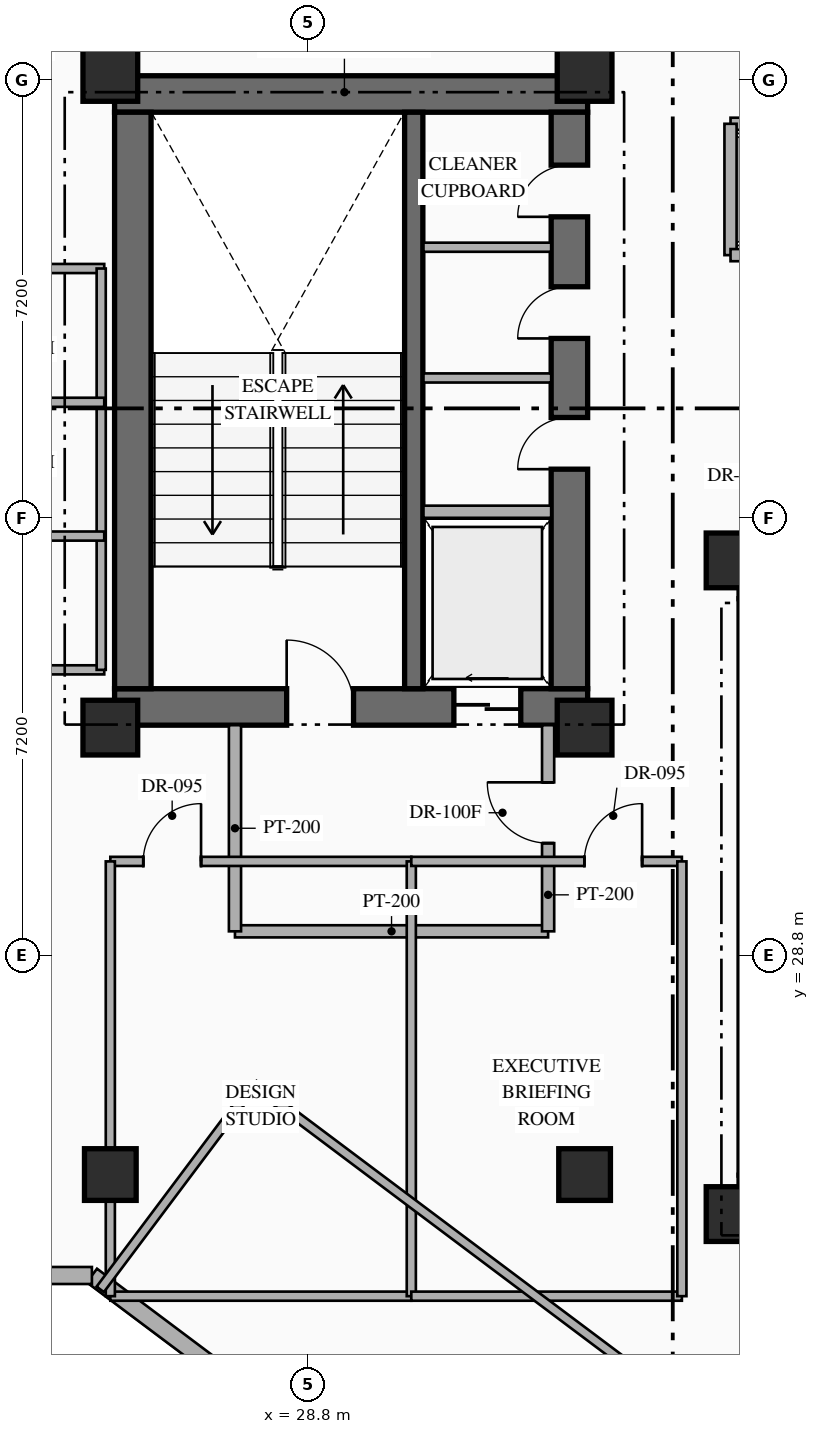
"""IFC4 building model, lengths in metres.
Left out: names, types, materials, properties, quantities, classifications, styles, units other than length and angle.
Written with IfcOpenShell. Run it as: python <this file> out.ifc"""

import sys

from ifc_helpers import new_model, si_unit, direction, frame, frame_2d, origin, origin_2d, place, context, subcontext, project, spatial, rectangle, hollow_rectangle, extrude, element, fill, save


model = new_model("IFC4")
c1 = context("Model", 3, precision=1e-05, world=origin(), true_north=direction((0.0, 1.0)))
c2 = subcontext(c1, "Body", "Model", "MODEL_VIEW")
j1 = project(units=[si_unit("LENGTHUNIT", "METRE"), si_unit("PLANEANGLEUNIT", "RADIAN")], contexts=[c1])
p1 = place(None, origin())
s1 = spatial("IfcSite", under=j1, at=p1, CompositionType="ELEMENT")
p2 = place(p1, origin())
s2 = spatial("IfcBuilding", under=s1, at=p2, CompositionType="ELEMENT")
p3 = place(p2, frame((0.0, 0.0, 138.45)))
s3 = spatial("IfcBuildingStorey", under=s2, at=p3, CompositionType="ELEMENT", Elevation=138.45)
p4 = place(p3, frame((25.62, 32.89, 0.0), z_axis=(0.0, 0.0, 1.0), x_axis=(1.0, 0.0, 0.0)))
e1 = element("IfcWall", 1, at=p4, inside=s3, PredefinedType="SHEAR", context=c2, shape_type="SweptSolid", body=[
    extrude(rectangle(XDim=7.78, YDim=0.6, at=frame_2d((3.89, 0.0))), origin(), (0.0, 0.0, 1.0), 3.6),
])
p5 = place(p4, frame((2.83, 0.0, 0.0)))
e2 = element("IfcOpeningElement", 2, at=p5, cuts=e1, PredefinedType="OPENING", context=c2, shape_type="SweptSolid", body=[
    extrude(rectangle(XDim=1.1, YDim=2.2, at=frame_2d((0.55, 1.1))), frame((0.0, 0.31, 0.0), z_axis=(0.0, -1.0, 0.0), x_axis=(1.0, 0.0, 0.0)), (0.0, 0.0, 1.0), 0.62),
])
p6 = place(p4, frame((5.58, 0.0, 0.0)))
e3 = element("IfcOpeningElement", 3, at=p6, cuts=e1, PredefinedType="OPENING", context=c2, shape_type="SweptSolid", body=[
    extrude(rectangle(XDim=1.1, YDim=2.15, at=frame_2d((0.55, 1.075))), frame((0.0, 0.31, 0.0), z_axis=(0.0, -1.0, 0.0), x_axis=(1.0, 0.0, 0.0)), (0.0, 0.0, 1.0), 0.62),
])
p7 = place(p3, frame((25.62, 42.97, 0.0), z_axis=(0.0, 0.0, 1.0), x_axis=(1.0, 0.0, 0.0)))
e4 = element("IfcWall", 4, at=p7, inside=s3, PredefinedType="SHEAR", context=c2, shape_type="SweptSolid", body=[
    extrude(rectangle(XDim=7.78, YDim=0.6, at=frame_2d((3.89, 0.0))), origin(), (0.0, 0.0, 1.0), 3.6),
])
p8 = place(p3, frame((25.92, 33.19, 0.0), z_axis=(0.0, 0.0, 1.0), x_axis=(0.0, 1.0, 0.0)))
e5 = element("IfcWall", 5, at=p8, inside=s3, PredefinedType="SHEAR", context=c2, shape_type="SweptSolid", body=[
    extrude(rectangle(XDim=9.48, YDim=0.6, at=frame_2d((4.74, 0.0))), origin(), (0.0, 0.0, 1.0), 3.6),
])
p9 = place(p3, frame((33.1, 33.19, 0.0), z_axis=(0.0, 0.0, 1.0), x_axis=(0.0, 1.0, 0.0)))
e6 = element("IfcWall", 6, at=p9, inside=s3, PredefinedType="SHEAR", context=c2, shape_type="SweptSolid", body=[
    extrude(rectangle(XDim=9.48, YDim=0.6, at=frame_2d((4.74, 0.0))), origin(), (0.0, 0.0, 1.0), 3.6),
])
p10 = place(p9, frame((3.61, 0.0, 0.0)))
e7 = element("IfcOpeningElement", 7, at=p10, cuts=e6, PredefinedType="OPENING", context=c2, shape_type="SweptSolid", body=[
    extrude(rectangle(XDim=0.85, YDim=2.08, at=frame_2d((0.425, 1.04))), frame((0.0, 0.31, 0.0), z_axis=(0.0, -1.0, 0.0), x_axis=(1.0, 0.0, 0.0)), (0.0, 0.0, 1.0), 0.62),
])
p11 = place(p9, frame((5.76, 0.0, 0.0)))
e8 = element("IfcOpeningElement", 8, at=p11, cuts=e6, PredefinedType="OPENING", context=c2, shape_type="SweptSolid", body=[
    extrude(rectangle(XDim=0.85, YDim=2.08, at=frame_2d((0.425, 1.04))), frame((0.0, 0.31, 0.0), z_axis=(0.0, -1.0, 0.0), x_axis=(1.0, 0.0, 0.0)), (0.0, 0.0, 1.0), 0.62),
])
p12 = place(p9, frame((7.76, 0.0, 0.0)))
e9 = element("IfcOpeningElement", 9, at=p12, cuts=e6, PredefinedType="OPENING", context=c2, shape_type="SweptSolid", body=[
    extrude(rectangle(XDim=0.85, YDim=2.08, at=frame_2d((0.425, 1.04))), frame((0.0, 0.31, 0.0), z_axis=(0.0, -1.0, 0.0), x_axis=(1.0, 0.0, 0.0)), (0.0, 0.0, 1.0), 0.62),
])
p13 = place(p3, frame((30.54, 33.19, 0.0), z_axis=(0.0, 0.0, 1.0), x_axis=(0.0, 1.0, 0.0)))
e10 = element("IfcWall", 10, at=p13, inside=s3, PredefinedType="SHEAR", context=c2, shape_type="SweptSolid", body=[
    extrude(rectangle(XDim=9.48, YDim=0.3, at=frame_2d((4.74, 0.0))), origin(), (0.0, 0.0, 1.0), 3.6),
])
p14 = place(p3, frame((35.89, 24.89, 0.0), z_axis=(0.0, 0.0, 1.0), x_axis=(1.0, 0.0, 0.0)))
e11 = element("IfcWall", 11, at=p14, inside=s3, PredefinedType="SHEAR", context=c2, shape_type="SweptSolid", body=[
    extrude(rectangle(XDim=7.76, YDim=0.6, at=frame_2d((3.88, 0.0))), origin(), (0.0, 0.0, 1.0), 3.6),
])
p15 = place(p3, frame((35.89, 34.97, 0.0), z_axis=(0.0, 0.0, 1.0), x_axis=(1.0, 0.0, 0.0)))
e12 = element("IfcWall", 12, at=p15, inside=s3, PredefinedType="SHEAR", context=c2, shape_type="SweptSolid", body=[
    extrude(rectangle(XDim=7.76, YDim=0.6, at=frame_2d((3.88, 0.0))), origin(), (0.0, 0.0, 1.0), 3.6),
])
p16 = place(p15, frame((2.66, 0.0, 0.0)))
e13 = element("IfcOpeningElement", 13, at=p16, cuts=e12, PredefinedType="OPENING", context=c2, shape_type="SweptSolid", body=[
    extrude(rectangle(XDim=1.1, YDim=2.2, at=frame_2d((0.55, 1.1))), frame((0.0, 0.31, 0.0), z_axis=(0.0, -1.0, 0.0), x_axis=(1.0, 0.0, 0.0)), (0.0, 0.0, 1.0), 0.62),
])
p17 = place(p15, frame((5.56, 0.0, 0.0)))
e14 = element("IfcOpeningElement", 14, at=p17, cuts=e12, PredefinedType="OPENING", context=c2, shape_type="SweptSolid", body=[
    extrude(rectangle(XDim=1.12, YDim=2.15, at=frame_2d((0.56, 1.075))), frame((0.0, 0.31, 0.0), z_axis=(0.0, -1.0, 0.0), x_axis=(1.0, 0.0, 0.0)), (0.0, 0.0, 1.0), 0.62),
])
p18 = place(p3, frame((36.19, 25.19, 0.0), z_axis=(0.0, 0.0, 1.0), x_axis=(0.0, 1.0, 0.0)))
e15 = element("IfcWall", 15, at=p18, inside=s3, PredefinedType="SHEAR", context=c2, shape_type="SweptSolid", body=[
    extrude(rectangle(XDim=9.48, YDim=0.6, at=frame_2d((4.74, 0.0))), origin(), (0.0, 0.0, 1.0), 3.6),
])
for number, where, z_axis, x_axis in (
    (16, (25.55, 32.55, 0.0), (0.0, 0.0, 1.0), (1.0, 0.0, 0.0)),
    (17, (33.35, 32.55, 0.0), (0.0, 0.0, 1.0), (1.0, 0.0, 0.0)),
    (18, (25.55, 43.3, 0.0), (0.0, 0.0, 1.0), (1.0, 0.0, 0.0)),
    (19, (33.35, 43.3, 0.0), (0.0, 0.0, 1.0), (1.0, 0.0, 0.0)),
    (20, (35.8, 24.55, 0.0), (0.0, 0.0, 1.0), (1.0, 0.0, 0.0)),
    (21, (35.8, 35.3, 0.0), (0.0, 0.0, 1.0), (1.0, 0.0, 0.0)),
):
    element("IfcColumn", number, at=place(p3, frame(where, z_axis=z_axis, x_axis=x_axis)), inside=s3, PredefinedType="COLUMN", context=c2, shape_type="SweptSolid", body=[
        extrude(rectangle(XDim=0.9, YDim=0.9, at=origin_2d()), origin(), (0.0, 0.0, 1.0), 3.6),
    ])
for number, where, z_axis, x_axis in (
    (22, (25.55, 25.2, 0.0), (0.0, 0.0, 1.0), (1.0, 0.0, 0.0)),
    (23, (33.35, 25.2, 0.0), (0.0, 0.0, 1.0), (1.0, 0.0, 0.0)),
):
    element("IfcColumn", number, at=place(p3, frame(where, z_axis=z_axis, x_axis=x_axis)), inside=s3, PredefinedType="COLUMN", context=c2, shape_type="SweptSolid", body=[
        extrude(hollow_rectangle(XDim=0.85, YDim=0.85, WallThickness=0.032, at=origin_2d()), origin(), (0.0, 0.0, 1.0), 3.6),
    ])
p19 = place(p3, frame((44.918, 8.787, 0.0), z_axis=(0.0, 0.0, 1.0), x_axis=(-0.800004765927, 0.599993645378, 0.0)))
e24 = element("IfcWall", 24, at=p19, inside=s3, PredefinedType="STANDARD", context=c2, shape_type="SweptSolid", body=[
    extrude(rectangle(XDim=24.588, YDim=0.28, at=frame_2d((12.294, 0.0))), origin(), (0.0, 0.0, 1.0), 3.35),
])
p20 = place(p3, frame((25.247, 23.54, 0.0), z_axis=(0.0, 0.0, 1.0), x_axis=(-1.0, 0.0, 0.0)))
e25 = element("IfcWall", 25, at=p20, inside=s3, PredefinedType="STANDARD", context=c2, shape_type="SweptSolid", body=[
    extrude(rectangle(XDim=6.747, YDim=0.28, at=frame_2d((3.374, 0.0))), origin(), (0.0, 0.0, 1.0), 3.35),
])
p21 = place(p3, frame((30.7, 36.1, 0.0), z_axis=(0.0, 0.0, 1.0), x_axis=(1.0, 0.0, 0.0)))
e26 = element("IfcWall", 26, at=p21, inside=s3, PredefinedType="STANDARD", context=c2, shape_type="SweptSolid", body=[
    extrude(rectangle(XDim=2.1, YDim=0.2, at=frame_2d((1.05, 0.0))), origin(), (0.0, 0.0, 1.0), 3.35),
])
for number, where, z_axis, x_axis in (
    (27, (30.7, 38.3, 0.0), (0.0, 0.0, 1.0), (1.0, 0.0, 0.0)),
    (28, (30.7, 40.45, 0.0), (0.0, 0.0, 1.0), (1.0, 0.0, 0.0)),
):
    element("IfcWall", number, at=place(p3, frame(where, z_axis=z_axis, x_axis=x_axis)), inside=s3, PredefinedType="PARTITIONING", context=c2, shape_type="SweptSolid", body=[
        extrude(rectangle(XDim=2.1, YDim=0.15, at=frame_2d((1.05, 0.0))), origin(), (0.0, 0.0, 1.0), 3.35),
    ])
p22 = place(p3, frame((27.6, 29.2, 0.0), z_axis=(0.0, 0.0, 1.0), x_axis=(1.0, 0.0, 0.0)))
e29 = element("IfcWall", 29, at=p22, inside=s3, PredefinedType="STANDARD", context=c2, shape_type="SweptSolid", body=[
    extrude(rectangle(XDim=5.15, YDim=0.2, at=frame_2d((2.575, 0.0))), origin(), (0.0, 0.0, 1.0), 3.35),
])
p23 = place(p3, frame((27.6, 29.2, 0.0), z_axis=(0.0, 0.0, 1.0), x_axis=(0.0, 1.0, 0.0)))
e30 = element("IfcWall", 30, at=p23, inside=s3, PredefinedType="STANDARD", context=c2, shape_type="SweptSolid", body=[
    extrude(rectangle(XDim=3.39, YDim=0.2, at=frame_2d((1.695, 0.0))), origin(), (0.0, 0.0, 1.0), 3.35),
])
p24 = place(p3, frame((32.75, 29.2, 0.0), z_axis=(0.0, 0.0, 1.0), x_axis=(0.0, 1.0, 0.0)))
e31 = element("IfcWall", 31, at=p24, inside=s3, PredefinedType="STANDARD", context=c2, shape_type="SweptSolid", body=[
    extrude(rectangle(XDim=3.39, YDim=0.2, at=frame_2d((1.695, 0.0))), origin(), (0.0, 0.0, 1.0), 3.35),
])
p25 = place(p24, frame((1.45, 0.0, 0.0)))
e32 = element("IfcOpeningElement", 32, at=p25, cuts=e31, PredefinedType="OPENING", context=c2, shape_type="SweptSolid", body=[
    extrude(rectangle(XDim=1.0, YDim=2.2, at=frame_2d((0.5, 1.1))), frame((0.0, 0.11, 0.0), z_axis=(0.0, -1.0, 0.0), x_axis=(1.0, 0.0, 0.0)), (0.0, 0.0, 1.0), 0.22),
])
p26 = place(p3, frame((35.75, 42.48, 0.0), z_axis=(0.0, 0.0, 1.0), x_axis=(1.0, 0.0, 0.0)))
e33 = element("IfcWall", 33, at=p26, inside=s3, PredefinedType="STANDARD", context=c2, shape_type="SweptSolid", body=[
    extrude(rectangle(XDim=9.11, YDim=0.2, at=frame_2d((4.555, 0.0))), origin(), (0.0, 0.0, 1.0), 3.35),
])
p27 = place(p3, frame((35.75, 40.32, 0.0), z_axis=(0.0, 0.0, 1.0), x_axis=(0.0, 1.0, 0.0)))
e34 = element("IfcWall", 34, at=p27, inside=s3, PredefinedType="STANDARD", context=c2, shape_type="SweptSolid", body=[
    extrude(rectangle(XDim=2.16, YDim=0.2, at=frame_2d((1.08, 0.0))), origin(), (0.0, 0.0, 1.0), 3.35),
])
p28 = place(p3, frame((35.75, 40.32, 0.0), z_axis=(0.0, 0.0, 1.0), x_axis=(1.0, 0.0, 0.0)))
e35 = element("IfcWall", 35, at=p28, inside=s3, PredefinedType="STANDARD", context=c2, shape_type="SweptSolid", body=[
    extrude(rectangle(XDim=9.11, YDim=0.2, at=frame_2d((4.555, 0.0))), origin(), (0.0, 0.0, 1.0), 3.35),
])
p29 = place(p28, frame((0.53, 0.0, 0.0)))
e36 = element("IfcOpeningElement", 36, at=p29, cuts=e35, PredefinedType="OPENING", context=c2, shape_type="SweptSolid", body=[
    extrude(rectangle(XDim=1.1, YDim=2.18, at=frame_2d((0.55, 1.09))), frame((0.0, 0.11, 0.0), z_axis=(0.0, -1.0, 0.0), x_axis=(1.0, 0.0, 0.0)), (0.0, 0.0, 1.0), 0.22),
])
p30 = place(p28, frame((2.73, 0.0, 0.0)))
e37 = element("IfcOpeningElement", 37, at=p30, cuts=e35, PredefinedType="OPENING", context=c2, shape_type="SweptSolid", body=[
    extrude(rectangle(XDim=1.1, YDim=2.18, at=frame_2d((0.55, 1.09))), frame((0.0, 0.11, 0.0), z_axis=(0.0, -1.0, 0.0), x_axis=(1.0, 0.0, 0.0)), (0.0, 0.0, 1.0), 0.22),
])
p31 = place(p28, frame((4.93, 0.0, 0.0)))
e38 = element("IfcOpeningElement", 38, at=p31, cuts=e35, PredefinedType="OPENING", context=c2, shape_type="SweptSolid", body=[
    extrude(rectangle(XDim=1.1, YDim=2.18, at=frame_2d((0.55, 1.09))), frame((0.0, 0.11, 0.0), z_axis=(0.0, -1.0, 0.0), x_axis=(1.0, 0.0, 0.0)), (0.0, 0.0, 1.0), 0.22),
])
p32 = place(p28, frame((7.13, 0.0, 0.0)))
e39 = element("IfcOpeningElement", 39, at=p32, cuts=e35, PredefinedType="OPENING", context=c2, shape_type="SweptSolid", body=[
    extrude(rectangle(XDim=1.1, YDim=2.18, at=frame_2d((0.55, 1.09))), frame((0.0, 0.11, 0.0), z_axis=(0.0, -1.0, 0.0), x_axis=(1.0, 0.0, 0.0)), (0.0, 0.0, 1.0), 0.22),
])
for number, where, z_axis, x_axis in (
    (40, (22.15, 33.5, 0.0), (0.0, 0.0, 1.0), (1.0, 0.0, 0.0)),
    (41, (22.15, 40.1, 0.0), (0.0, 0.0, 1.0), (1.0, 0.0, 0.0)),
):
    element("IfcWall", number, at=place(p3, frame(where, z_axis=z_axis, x_axis=x_axis)), inside=s3, PredefinedType="PARTITIONING", context=c2, shape_type="SweptSolid", body=[
        extrude(rectangle(XDim=3.3, YDim=0.15, at=frame_2d((1.65, 0.0))), origin(), (0.0, 0.0, 1.0), 3.35),
    ])
p33 = place(p3, frame((25.4, 33.5, 0.0), z_axis=(0.0, 0.0, 1.0), x_axis=(0.0, 1.0, 0.0)))
e42 = element("IfcWall", 42, at=p33, inside=s3, PredefinedType="PARTITIONING", context=c2, shape_type="SweptSolid", body=[
    extrude(rectangle(XDim=6.6, YDim=0.15, at=frame_2d((3.3, 0.0))), origin(), (0.0, 0.0, 1.0), 3.35),
])
for number, where, z_axis, x_axis in (
    (43, (22.15, 35.7, 0.0), (0.0, 0.0, 1.0), (1.0, 0.0, 0.0)),
    (44, (22.15, 37.9, 0.0), (0.0, 0.0, 1.0), (1.0, 0.0, 0.0)),
):
    element("IfcWall", number, at=place(p3, frame(where, z_axis=z_axis, x_axis=x_axis)), inside=s3, PredefinedType="PARTITIONING", context=c2, shape_type="SweptSolid", body=[
        extrude(rectangle(XDim=3.3, YDim=0.15, at=frame_2d((1.65, 0.0))), origin(), (0.0, 0.0, 1.0), 3.35),
    ])
p34 = place(p3, frame((25.55, 23.2, 0.0), z_axis=(0.0, 0.0, 1.0), x_axis=(1.0, 0.0, 0.0)))
e45 = element("IfcWall", 45, at=p34, inside=s3, PredefinedType="PARTITIONING", context=c2, shape_type="SweptSolid", body=[
    extrude(rectangle(XDim=4.95, YDim=0.15, at=frame_2d((2.475, 0.0))), origin(), (0.0, 0.0, 1.0), 3.35),
])
p35 = place(p3, frame((25.55, 30.35, 0.0), z_axis=(0.0, 0.0, 1.0), x_axis=(1.0, 0.0, 0.0)))
e46 = element("IfcWall", 46, at=p35, inside=s3, PredefinedType="PARTITIONING", context=c2, shape_type="SweptSolid", body=[
    extrude(rectangle(XDim=4.95, YDim=0.15, at=frame_2d((2.475, 0.0))), origin(), (0.0, 0.0, 1.0), 3.35),
])
p36 = place(p35, frame((0.542, 0.0, 0.0)))
e47 = element("IfcOpeningElement", 47, at=p36, cuts=e46, PredefinedType="OPENING", context=c2, shape_type="SweptSolid", body=[
    extrude(rectangle(XDim=0.95, YDim=2.15, at=frame_2d((0.475, 1.075))), frame((0.0, 0.085, 0.0), z_axis=(0.0, -1.0, 0.0), x_axis=(1.0, 0.0, 0.0)), (0.0, 0.0, 1.0), 0.17),
])
p37 = place(p3, frame((25.55, 23.2, 0.0), z_axis=(0.0, 0.0, 1.0), x_axis=(0.0, 1.0, 0.0)))
e48 = element("IfcWall", 48, at=p37, inside=s3, PredefinedType="PARTITIONING", context=c2, shape_type="SweptSolid", body=[
    extrude(rectangle(XDim=7.15, YDim=0.15, at=frame_2d((3.575, 0.0))), origin(), (0.0, 0.0, 1.0), 2.695),
])
p38 = place(p3, frame((30.5, 23.2, 0.0), z_axis=(0.0, 0.0, 1.0), x_axis=(0.0, 1.0, 0.0)))
e49 = element("IfcWall", 49, at=p38, inside=s3, PredefinedType="PARTITIONING", context=c2, shape_type="SweptSolid", body=[
    extrude(rectangle(XDim=7.15, YDim=0.15, at=frame_2d((3.575, 0.0))), origin(), (0.0, 0.0, 1.0), 3.35),
])
p39 = place(p3, frame((30.5, 23.2, 0.0), z_axis=(0.0, 0.0, 1.0), x_axis=(1.0, 0.0, 0.0)))
e50 = element("IfcWall", 50, at=p39, inside=s3, PredefinedType="PARTITIONING", context=c2, shape_type="SweptSolid", body=[
    extrude(rectangle(XDim=4.45, YDim=0.15, at=frame_2d((2.225, 0.0))), origin(), (0.0, 0.0, 1.0), 3.35),
])
p40 = place(p3, frame((30.5, 30.35, 0.0), z_axis=(0.0, 0.0, 1.0), x_axis=(1.0, 0.0, 0.0)))
e51 = element("IfcWall", 51, at=p40, inside=s3, PredefinedType="PARTITIONING", context=c2, shape_type="SweptSolid", body=[
    extrude(rectangle(XDim=4.45, YDim=0.15, at=frame_2d((2.225, 0.0))), origin(), (0.0, 0.0, 1.0), 3.35),
])
p41 = place(p40, frame((2.846, 0.0, 0.0)))
e52 = element("IfcOpeningElement", 52, at=p41, cuts=e51, PredefinedType="OPENING", context=c2, shape_type="SweptSolid", body=[
    extrude(rectangle(XDim=0.95, YDim=2.15, at=frame_2d((0.475, 1.075))), frame((0.0, 0.085, 0.0), z_axis=(0.0, -1.0, 0.0), x_axis=(1.0, 0.0, 0.0)), (0.0, 0.0, 1.0), 0.17),
])
p42 = place(p3, frame((34.95, 23.2, 0.0), z_axis=(0.0, 0.0, 1.0), x_axis=(0.0, 1.0, 0.0)))
e53 = element("IfcWall", 53, at=p42, inside=s3, PredefinedType="PARTITIONING", context=c2, shape_type="SweptSolid", body=[
    extrude(rectangle(XDim=7.15, YDim=0.15, at=frame_2d((3.575, 0.0))), origin(), (0.0, 0.0, 1.0), 3.35),
])
p43 = place(p3, frame((27.91, 26.68, 0.0), z_axis=(0.0, 0.0, 1.0), x_axis=(0.800005938517, -0.599992081896, 0.0)))
e54 = element("IfcWall", 54, at=p43, inside=s3, PredefinedType="PARTITIONING", context=c2, shape_type="SweptSolid", body=[
    extrude(rectangle(XDim=14.8, YDim=0.15, at=frame_2d((7.4, 0.0))), origin(), (0.0, 0.0, 1.0), 3.35),
])
p44 = place(p43, frame((9.281, 0.0, 0.0)))
e55 = element("IfcOpeningElement", 55, at=p44, cuts=e54, PredefinedType="OPENING", context=c2, shape_type="SweptSolid", body=[
    extrude(rectangle(XDim=0.95, YDim=2.15, at=frame_2d((0.475, 1.075))), frame((0.0, 0.085, 0.0), z_axis=(0.0, -1.0, 0.0), x_axis=(1.0, 0.0, 0.0)), (0.0, 0.0, 1.0), 0.17),
])
p45 = place(p3, frame((25.384, 23.312, 0.0), z_axis=(0.0, 0.0, 1.0), x_axis=(0.599990721155, 0.80000695905, 0.0)))
e56 = element("IfcWall", 56, at=p45, inside=s3, PredefinedType="PARTITIONING", context=c2, shape_type="SweptSolid", body=[
    extrude(rectangle(XDim=4.21, YDim=0.15, at=frame_2d((2.105, 0.0))), origin(), (0.0, 0.0, 1.0), 3.35),
])
p46 = place(p5, origin())
e57 = element("IfcDoor", 57, at=p46, inside=s3, OperationType="SINGLE_SWING_LEFT", PredefinedType="DOOR", context=c2, shape_type="SweptSolid", body=[
    extrude(rectangle(XDim=1.1, YDim=2.2, at=frame_2d((0.55, 1.1))), frame((0.0, 0.025, 0.0), z_axis=(0.0, -1.0, 0.0), x_axis=(1.0, 0.0, 0.0)), (0.0, 0.0, 1.0), 0.05),
])
fill(e2, e57)
p47 = place(p6, origin())
e58 = element("IfcDoor", 58, at=p47, inside=s3, OperationType="SLIDING_TO_LEFT", PredefinedType="USERDEFINED", context=c2, shape_type="SweptSolid", body=[
    extrude(rectangle(XDim=1.1, YDim=2.15, at=frame_2d((0.55, 1.075))), frame((0.0, 0.025, 0.0), z_axis=(0.0, -1.0, 0.0), x_axis=(1.0, 0.0, 0.0)), (0.0, 0.0, 1.0), 0.05),
])
fill(e3, e58)
p48 = place(p10, origin())
e59 = element("IfcDoor", 59, at=p48, inside=s3, OperationType="SINGLE_SWING_LEFT", PredefinedType="DOOR", context=c2, shape_type="SweptSolid", body=[
    extrude(rectangle(XDim=0.85, YDim=2.08, at=frame_2d((0.425, 1.04))), frame((0.0, 0.025, 0.0), z_axis=(0.0, -1.0, 0.0), x_axis=(1.0, 0.0, 0.0)), (0.0, 0.0, 1.0), 0.05),
])
fill(e7, e59)
p49 = place(p11, origin())
e60 = element("IfcDoor", 60, at=p49, inside=s3, OperationType="SINGLE_SWING_LEFT", PredefinedType="DOOR", context=c2, shape_type="SweptSolid", body=[
    extrude(rectangle(XDim=0.85, YDim=2.08, at=frame_2d((0.425, 1.04))), frame((0.0, 0.025, 0.0), z_axis=(0.0, -1.0, 0.0), x_axis=(1.0, 0.0, 0.0)), (0.0, 0.0, 1.0), 0.05),
])
fill(e8, e60)
p50 = place(p12, origin())
e61 = element("IfcDoor", 61, at=p50, inside=s3, OperationType="SINGLE_SWING_LEFT", PredefinedType="DOOR", context=c2, shape_type="SweptSolid", body=[
    extrude(rectangle(XDim=0.85, YDim=2.08, at=frame_2d((0.425, 1.04))), frame((0.0, 0.025, 0.0), z_axis=(0.0, -1.0, 0.0), x_axis=(1.0, 0.0, 0.0)), (0.0, 0.0, 1.0), 0.05),
])
fill(e9, e61)
p51 = place(p25, origin())
e62 = element("IfcDoor", 62, at=p51, inside=s3, OperationType="SINGLE_SWING_RIGHT", PredefinedType="DOOR", context=c2, shape_type="SweptSolid", body=[
    extrude(rectangle(XDim=1.0, YDim=2.2, at=frame_2d((0.5, 1.1))), frame((0.0, 0.025, 0.0), z_axis=(0.0, -1.0, 0.0), x_axis=(1.0, 0.0, 0.0)), (0.0, 0.0, 1.0), 0.05),
])
fill(e32, e62)
p52 = place(p36, origin())
e63 = element("IfcDoor", 63, at=p52, inside=s3, OperationType="SINGLE_SWING_RIGHT", PredefinedType="DOOR", context=c2, shape_type="SweptSolid", body=[
    extrude(rectangle(XDim=0.95, YDim=2.15, at=frame_2d((0.475, 1.075))), frame((0.0, 0.025, 0.0), z_axis=(0.0, -1.0, 0.0), x_axis=(1.0, 0.0, 0.0)), (0.0, 0.0, 1.0), 0.05),
])
fill(e47, e63)
p53 = place(p41, origin())
e64 = element("IfcDoor", 64, at=p53, inside=s3, OperationType="SINGLE_SWING_RIGHT", PredefinedType="DOOR", context=c2, shape_type="SweptSolid", body=[
    extrude(rectangle(XDim=0.95, YDim=2.15, at=frame_2d((0.475, 1.075))), frame((0.0, 0.025, 0.0), z_axis=(0.0, -1.0, 0.0), x_axis=(1.0, 0.0, 0.0)), (0.0, 0.0, 1.0), 0.05),
])
fill(e52, e64)
save(model, sys.argv[1])
